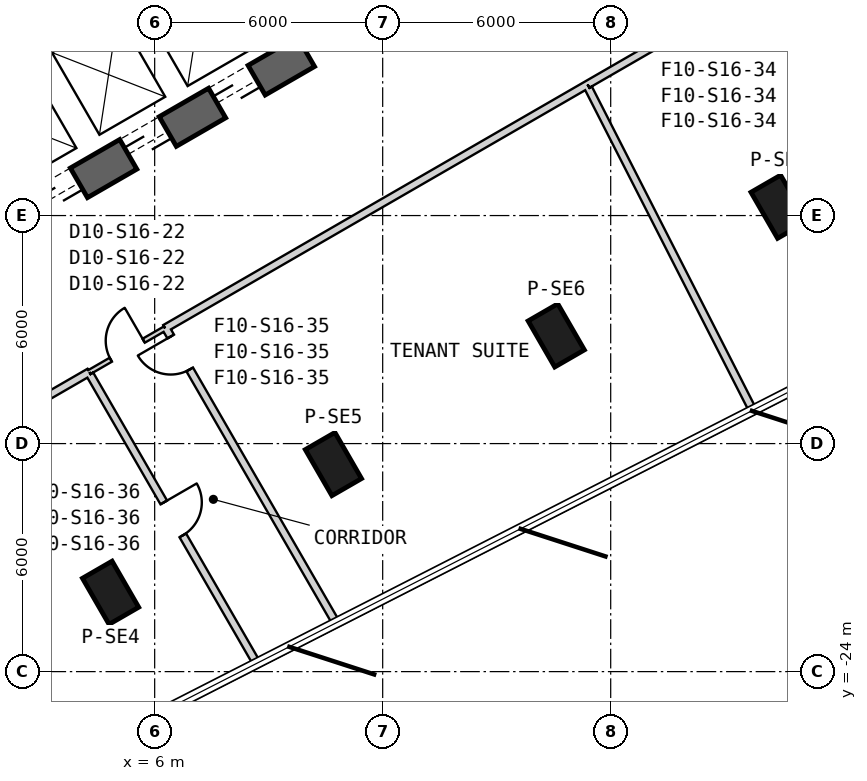
"""IFC4 building model, lengths in metres.
Left out: names, types, materials, properties, quantities, classifications, styles, units other than length and angle.
Written with IfcOpenShell. Run it as: python <this file> out.ifc"""

import sys

from ifc_helpers import new_model, si_unit, direction, frame, frame_2d, origin, origin_2d, place, context, subcontext, project, spatial, rectangle, extrude, element, fill, save


model = new_model("IFC4")
c1 = context("Model", 3, precision=1e-05, world=origin(), true_north=direction((0.0, 1.0)))
c2 = subcontext(c1, "Body", "Model", "MODEL_VIEW")
j1 = project(units=[si_unit("LENGTHUNIT", "METRE"), si_unit("PLANEANGLEUNIT", "RADIAN")], contexts=[c1])
p1 = place(None, origin())
s1 = spatial("IfcSite", under=j1, at=p1, CompositionType="ELEMENT")
p2 = place(p1, origin())
s2 = spatial("IfcBuilding", under=s1, at=p2, CompositionType="ELEMENT")
p3 = place(p2, frame((0.0, 0.0, 253.2)))
s3 = spatial("IfcBuildingStorey", under=s2, at=p3, CompositionType="ELEMENT", Elevation=253.2)
for number, where, z_axis, x_axis in (
    (1, (4.84, -21.925, 0.0), (0.0, 0.0, 1.0), (0.5, -0.866, 0.0)),
    (2, (10.704, -18.539, 0.0), (0.0, 0.0, 1.0), (0.5, -0.866, 0.0)),
    (3, (16.567, -15.154, 0.0), (0.0, 0.0, 1.0), (0.5, -0.866, 0.0)),
    (4, (22.431, -11.768, 0.0), (0.0, 0.0, 1.0), (0.5, -0.866, 0.0)),
):
    element("IfcColumn", number, at=place(p3, frame(where, z_axis=z_axis, x_axis=x_axis)), inside=s3, PredefinedType="COLUMN", context=c2, shape_type="SweptSolid", body=[
        extrude(rectangle(XDim=1.4, YDim=0.9, at=origin_2d()), origin(), (0.0, 0.0, 1.0), 4.0),
    ])
p4 = place(p3, frame((-7.825, -17.97, 0.0), z_axis=(0.0, 0.0, 1.0), x_axis=(0.866028369851, 0.499994862586, 0.0)))
e5 = element("IfcWall", 5, at=p4, inside=s3, PredefinedType="SHEAR", context=c2, shape_type="SweptSolid", body=[
    extrude(rectangle(XDim=31.523, YDim=0.9, at=frame_2d((15.762, 0.0))), origin(), (0.0, 0.0, 1.0), 4.0),
])
p5 = place(p4, frame((7.062, 0.0, 0.0)))
e6 = element("IfcOpeningElement", 6, at=p5, cuts=e5, PredefinedType="OPENING", context=c2, shape_type="SweptSolid", body=[
    extrude(rectangle(XDim=1.2, YDim=2.4, at=frame_2d((0.6, 1.2))), frame((0.0, 0.46, 0.0), z_axis=(0.0, -1.0, 0.0), x_axis=(1.0, 0.0, 0.0)), (0.0, 0.0, 1.0), 0.92),
])
p6 = place(p4, frame((9.762, 0.0, 0.0)))
e7 = element("IfcOpeningElement", 7, at=p6, cuts=e5, PredefinedType="OPENING", context=c2, shape_type="SweptSolid", body=[
    extrude(rectangle(XDim=1.2, YDim=2.4, at=frame_2d((0.6, 1.2))), frame((0.0, 0.46, 0.0), z_axis=(0.0, -1.0, 0.0), x_axis=(1.0, 0.0, 0.0)), (0.0, 0.0, 1.0), 0.92),
])
p7 = place(p4, frame((12.462, 0.0, 0.0)))
e8 = element("IfcOpeningElement", 8, at=p7, cuts=e5, PredefinedType="OPENING", context=c2, shape_type="SweptSolid", body=[
    extrude(rectangle(XDim=1.2, YDim=2.4, at=frame_2d((0.6, 1.2))), frame((0.0, 0.46, 0.0), z_axis=(0.0, -1.0, 0.0), x_axis=(1.0, 0.0, 0.0)), (0.0, 0.0, 1.0), 0.92),
])
p8 = place(p4, frame((15.162, 0.0, 0.0)))
e9 = element("IfcOpeningElement", 9, at=p8, cuts=e5, PredefinedType="OPENING", context=c2, shape_type="SweptSolid", body=[
    extrude(rectangle(XDim=1.2, YDim=2.4, at=frame_2d((0.6, 1.2))), frame((0.0, 0.46, 0.0), z_axis=(0.0, -1.0, 0.0), x_axis=(1.0, 0.0, 0.0)), (0.0, 0.0, 1.0), 0.92),
])
p9 = place(p4, frame((17.862, 0.0, 0.0)))
e10 = element("IfcOpeningElement", 10, at=p9, cuts=e5, PredefinedType="OPENING", context=c2, shape_type="SweptSolid", body=[
    extrude(rectangle(XDim=1.2, YDim=2.4, at=frame_2d((0.6, 1.2))), frame((0.0, 0.46, 0.0), z_axis=(0.0, -1.0, 0.0), x_axis=(1.0, 0.0, 0.0)), (0.0, 0.0, 1.0), 0.92),
])
p10 = place(p4, frame((20.562, 0.0, 0.0)))
e11 = element("IfcOpeningElement", 11, at=p10, cuts=e5, PredefinedType="OPENING", context=c2, shape_type="SweptSolid", body=[
    extrude(rectangle(XDim=1.2, YDim=2.4, at=frame_2d((0.6, 1.2))), frame((0.0, 0.46, 0.0), z_axis=(0.0, -1.0, 0.0), x_axis=(1.0, 0.0, 0.0)), (0.0, 0.0, 1.0), 0.92),
])
p11 = place(p4, frame((26.712, 0.0, 0.0)))
e12 = element("IfcOpeningElement", 12, at=p11, cuts=e5, PredefinedType="OPENING", context=c2, shape_type="SweptSolid", body=[
    extrude(rectangle(XDim=1.2, YDim=2.4, at=frame_2d((0.6, 1.2))), frame((0.0, 0.46, 0.0), z_axis=(0.0, -1.0, 0.0), x_axis=(1.0, 0.0, 0.0)), (0.0, 0.0, 1.0), 0.92),
])
p12 = place(p4, frame((3.612, 0.0, 0.0)))
e13 = element("IfcOpeningElement", 13, at=p12, cuts=e5, PredefinedType="OPENING", context=c2, shape_type="SweptSolid", body=[
    extrude(rectangle(XDim=1.2, YDim=2.4, at=frame_2d((0.6, 1.2))), frame((0.0, 0.46, 0.0), z_axis=(0.0, -1.0, 0.0), x_axis=(1.0, 0.0, 0.0)), (0.0, 0.0, 1.0), 0.92),
])
p13 = place(p3, frame((0.483, -8.936, 0.0), z_axis=(0.0, 0.0, 1.0), x_axis=(0.866030989016, 0.499990325971, 0.0)))
e14 = element("IfcWall", 14, at=p13, inside=s3, PredefinedType="PLUMBINGWALL", context=c2, shape_type="SweptSolid", body=[
    extrude(rectangle(XDim=8.1, YDim=0.2, at=frame_2d((4.05, 0.0))), origin(), (0.0, 0.0, 1.0), 3.7),
])
p14 = place(p3, frame((4.283, -16.118, 0.0), z_axis=(0.0, 0.0, 1.0), x_axis=(0.866053019151, 0.499952165731, 0.0)))
e15 = element("IfcWall", 15, at=p14, inside=s3, PredefinedType="PARTITIONING", context=c2, shape_type="SweptSolid", body=[
    extrude(rectangle(XDim=2.3, YDim=0.12, at=frame_2d((1.15, 0.0))), origin(), (0.0, 0.0, 1.0), 3.7),
])
p15 = place(p14, frame((0.65, 0.0, 0.0)))
e16 = element("IfcOpeningElement", 16, at=p15, cuts=e15, PredefinedType="OPENING", context=c2, shape_type="SweptSolid", body=[
    extrude(rectangle(XDim=1.0, YDim=2.1, at=frame_2d((0.5, 1.05))), frame((0.0, 0.07, 0.0), z_axis=(0.0, -1.0, 0.0), x_axis=(1.0, 0.0, 0.0)), (0.0, 0.0, 1.0), 0.14),
])
p16 = place(p3, frame((-0.723, -19.008, 0.0), z_axis=(0.0, 0.0, 1.0), x_axis=(0.866014659605, 0.500018609004, 0.0)))
e17 = element("IfcWall", 17, at=p16, inside=s3, PredefinedType="PARTITIONING", context=c2, shape_type="SweptSolid", body=[
    extrude(rectangle(XDim=5.78, YDim=0.2, at=frame_2d((2.89, 0.0))), origin(), (0.0, 0.0, 1.0), 2.98),
])
p17 = place(p3, frame((6.275, -14.968, 0.0), z_axis=(0.0, 0.0, 1.0), x_axis=(0.866025615516, 0.499999633269, 0.0)))
e18 = element("IfcWall", 18, at=p17, inside=s3, PredefinedType="PARTITIONING", context=c2, shape_type="SweptSolid", body=[
    extrude(rectangle(XDim=12.834, YDim=0.2, at=frame_2d((6.417, 0.0))), origin(), (0.0, 0.0, 1.0), 2.98),
])
p18 = place(p3, frame((17.39, -8.551, 0.0), z_axis=(0.0, 0.0, 1.0), x_axis=(0.866034791923, 0.499983738914, 0.0)))
e19 = element("IfcWall", 19, at=p18, inside=s3, PredefinedType="PARTITIONING", context=c2, shape_type="SweptSolid", body=[
    extrude(rectangle(XDim=5.662, YDim=0.2, at=frame_2d((2.831, 0.0))), origin(), (0.0, 0.0, 1.0), 2.98),
])
p19 = place(p18, frame((2.331, 0.0, 0.0)))
e20 = element("IfcOpeningElement", 20, at=p19, cuts=e19, PredefinedType="OPENING", context=c2, shape_type="SweptSolid", body=[
    extrude(rectangle(XDim=1.0, YDim=2.1, at=frame_2d((0.5, 1.05))), frame((0.0, 0.11, 0.0), z_axis=(0.0, -1.0, 0.0), x_axis=(1.0, 0.0, 0.0)), (0.0, 0.0, 1.0), 0.22),
])
p20 = place(p3, frame((10.772, -22.718, 0.0), z_axis=(0.0, 0.0, 1.0), x_axis=(-0.500006581979, 0.866021603644, 0.0)))
e21 = element("IfcWall", 21, at=p20, inside=s3, PredefinedType="PARTITIONING", context=c2, shape_type="SweptSolid", body=[
    extrude(rectangle(XDim=8.901, YDim=0.2, at=frame_2d((4.45, 0.0))), origin(), (0.0, 0.0, 1.0), 3.7),
])
p21 = place(p20, frame((7.701, 0.0, 0.0)))
e22 = element("IfcOpeningElement", 22, at=p21, cuts=e21, PredefinedType="OPENING", context=c2, shape_type="SweptSolid", body=[
    extrude(rectangle(XDim=1.0, YDim=2.1, at=frame_2d((0.5, 1.05))), frame((0.0, 0.11, 0.0), z_axis=(0.0, -1.0, 0.0), x_axis=(1.0, 0.0, 0.0)), (0.0, 0.0, 1.0), 0.22),
])
p22 = place(p3, frame((4.295, -16.18, 0.0), z_axis=(0.0, 0.0, 1.0), x_axis=(0.499991252212, -0.866030454263, 0.0)))
e23 = element("IfcWall", 23, at=p22, inside=s3, PredefinedType="PARTITIONING", context=c2, shape_type="SweptSolid", body=[
    extrude(rectangle(XDim=8.78, YDim=0.2, at=frame_2d((4.39, 0.0))), origin(), (0.0, 0.0, 1.0), 3.7),
])
p23 = place(p22, frame((3.89, 0.0, 0.0)))
e24 = element("IfcOpeningElement", 24, at=p23, cuts=e23, PredefinedType="OPENING", context=c2, shape_type="SweptSolid", body=[
    extrude(rectangle(XDim=1.0, YDim=2.1, at=frame_2d((0.5, 1.05))), frame((0.0, 0.11, 0.0), z_axis=(0.0, -1.0, 0.0), x_axis=(1.0, 0.0, 0.0)), (0.0, 0.0, 1.0), 0.22),
])
p24 = place(p3, frame((17.416, -8.651, 0.0), z_axis=(0.0, 0.0, 1.0), x_axis=(0.45442670118, -0.890784133926, 0.0)))
e25 = element("IfcWall", 25, at=p24, inside=s3, PredefinedType="PARTITIONING", context=c2, shape_type="SweptSolid", body=[
    extrude(rectangle(XDim=9.512, YDim=0.2, at=frame_2d((4.756, 0.0))), origin(), (0.0, 0.0, 1.0), 2.98),
])
p25 = place(p15, origin())
e26 = element("IfcDoor", 26, at=p25, inside=s3, OperationType="SINGLE_SWING_LEFT", PredefinedType="NOTDEFINED", context=c2, shape_type="SweptSolid", body=[
    extrude(rectangle(XDim=1.0, YDim=2.1, at=frame_2d((0.5, 1.05))), frame((0.0, 0.025, 0.0), z_axis=(0.0, -1.0, 0.0), x_axis=(1.0, 0.0, 0.0)), (0.0, 0.0, 1.0), 0.05),
])
fill(e16, e26)
p26 = place(p21, origin())
e27 = element("IfcDoor", 27, at=p26, inside=s3, OperationType="SINGLE_SWING_LEFT", PredefinedType="USERDEFINED", context=c2, shape_type="SweptSolid", body=[
    extrude(rectangle(XDim=1.0, YDim=2.1, at=frame_2d((0.5, 1.05))), frame((0.0, 0.025, 0.0), z_axis=(0.0, -1.0, 0.0), x_axis=(1.0, 0.0, 0.0)), (0.0, 0.0, 1.0), 0.05),
])
fill(e22, e27)
p27 = place(p23, origin())
e28 = element("IfcDoor", 28, at=p27, inside=s3, OperationType="SINGLE_SWING_LEFT", PredefinedType="USERDEFINED", context=c2, shape_type="SweptSolid", body=[
    extrude(rectangle(XDim=1.0, YDim=2.1, at=frame_2d((0.5, 1.05))), frame((0.0, 0.025, 0.0), z_axis=(0.0, -1.0, 0.0), x_axis=(1.0, 0.0, 0.0)), (0.0, 0.0, 1.0), 0.05),
])
fill(e24, e28)
p28 = place(p7, origin())
e29 = element("IfcDoor", 29, at=p28, inside=s3, OperationType="SLIDING_TO_LEFT", PredefinedType="USERDEFINED", context=c2, shape_type="SweptSolid", body=[
    extrude(rectangle(XDim=1.2, YDim=2.4, at=frame_2d((0.6, 1.2))), frame((0.0, 0.025, 0.0), z_axis=(0.0, -1.0, 0.0), x_axis=(1.0, 0.0, 0.0)), (0.0, 0.0, 1.0), 0.05),
])
fill(e8, e29)
p29 = place(p8, origin())
e30 = element("IfcDoor", 30, at=p29, inside=s3, OperationType="SLIDING_TO_LEFT", PredefinedType="USERDEFINED", context=c2, shape_type="SweptSolid", body=[
    extrude(rectangle(XDim=1.2, YDim=2.4, at=frame_2d((0.6, 1.2))), frame((0.0, 0.025, 0.0), z_axis=(0.0, -1.0, 0.0), x_axis=(1.0, 0.0, 0.0)), (0.0, 0.0, 1.0), 0.05),
])
fill(e9, e30)
p30 = place(p9, origin())
e31 = element("IfcDoor", 31, at=p30, inside=s3, OperationType="SLIDING_TO_LEFT", PredefinedType="USERDEFINED", context=c2, shape_type="SweptSolid", body=[
    extrude(rectangle(XDim=1.2, YDim=2.4, at=frame_2d((0.6, 1.2))), frame((0.0, 0.025, 0.0), z_axis=(0.0, -1.0, 0.0), x_axis=(1.0, 0.0, 0.0)), (0.0, 0.0, 1.0), 0.05),
])
fill(e10, e31)
p31 = place(p10, origin())
e32 = element("IfcDoor", 32, at=p31, inside=s3, OperationType="SLIDING_TO_LEFT", PredefinedType="USERDEFINED", context=c2, shape_type="SweptSolid", body=[
    extrude(rectangle(XDim=1.2, YDim=2.4, at=frame_2d((0.6, 1.2))), frame((0.0, 0.025, 0.0), z_axis=(0.0, -1.0, 0.0), x_axis=(1.0, 0.0, 0.0)), (0.0, 0.0, 1.0), 0.05),
])
fill(e11, e32)
save(model, sys.argv[1])
